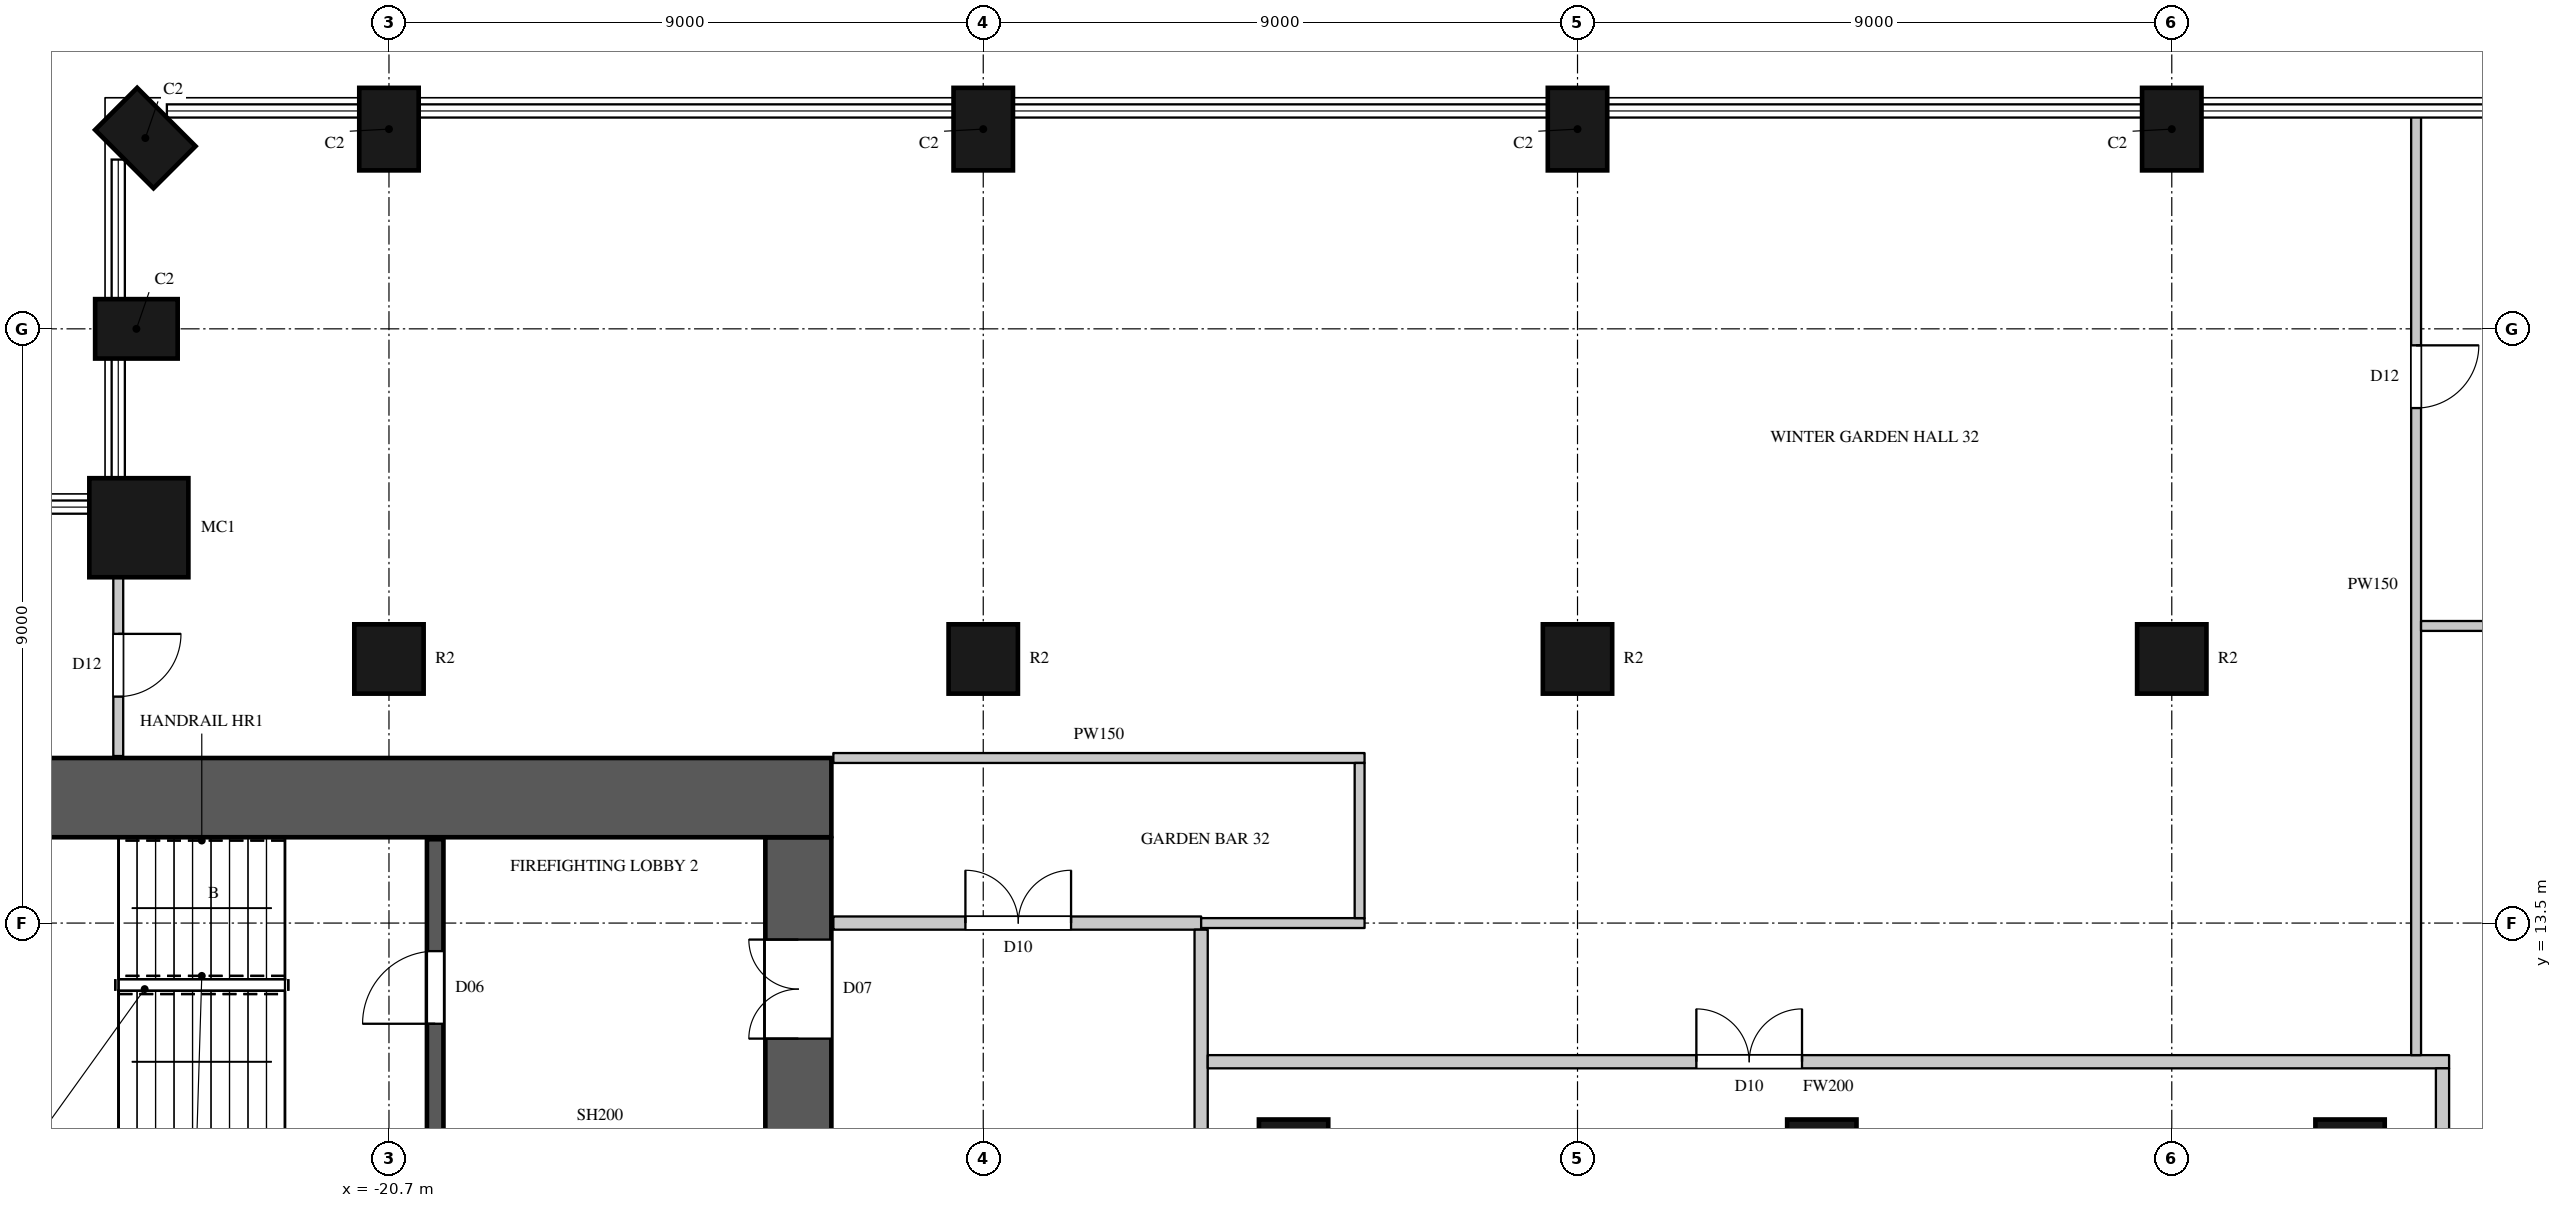
"""IFC4 building model, lengths in metres.
Left out: names, types, materials, properties, quantities, classifications, styles, units other than length and angle.
Written with IfcOpenShell. Run it as: python <this file> out.ifc"""

import sys

from ifc_helpers import new_model, si_unit, direction, frame, frame_2d, origin, origin_2d, place, context, subcontext, project, spatial, rectangle, circle, extrude, element, fill, save


model = new_model("IFC4")
c1 = context("Model", 3, precision=1e-05, world=origin(), true_north=direction((0.0, 1.0)))
c2 = subcontext(c1, "Body", "Model", "MODEL_VIEW")
j1 = project(units=[si_unit("LENGTHUNIT", "METRE"), si_unit("PLANEANGLEUNIT", "RADIAN")], contexts=[c1])
p1 = place(None, origin())
s1 = spatial("IfcSite", under=j1, at=p1, CompositionType="ELEMENT")
p2 = place(p1, origin())
s2 = spatial("IfcBuilding", under=s1, at=p2, CompositionType="ELEMENT")
p3 = place(p2, frame((0.0, 0.0, 145.5)))
s3 = spatial("IfcBuildingStorey", under=s2, at=p3, CompositionType="ELEMENT", Elevation=145.5)
for number, where, z_axis, x_axis in (
    (1, (6.3, 25.525, 0.0), (0.0, 0.0, 1.0), (-1.0, 0.0, 0.0)),
    (2, (-2.7, 25.525, 0.0), (0.0, 0.0, 1.0), (-1.0, 0.0, 0.0)),
    (3, (-11.7, 25.525, 0.0), (0.0, 0.0, 1.0), (-1.0, 0.0, 0.0)),
    (4, (-20.7, 25.525, 0.0), (0.0, 0.0, 1.0), (-1.0, 0.0, 0.0)),
    (5, (-24.39, 25.39, 0.0), (0.0, 0.0, 1.0), (-0.707, -0.707, 0.0)),
    (6, (-24.525, 22.5, 0.0), (0.0, 0.0, 1.0), (0.0, -1.0, 0.0)),
):
    element("IfcColumn", number, at=place(p3, frame(where, z_axis=z_axis, x_axis=x_axis)), inside=s3, PredefinedType="COLUMN", context=c2, shape_type="SweptSolid", body=[
        extrude(rectangle(XDim=0.9, YDim=1.25, at=origin_2d()), origin(), (0.0, 0.0, 1.0), 7.0),
    ])
p4 = place(p3, frame((-24.488, 19.488, 0.0), z_axis=(0.0, 0.0, 1.0), x_axis=(1.0, 0.0, 0.0)))
e7 = element("IfcColumn", 7, at=p4, inside=s3, PredefinedType="COLUMN", context=c2, shape_type="SweptSolid", body=[
    extrude(circle(Radius=0.75, at=origin_2d()), origin(), (0.0, 0.0, 1.0), 7.0),
])
for number, where, z_axis, x_axis in (
    (8, (-20.7, 17.5, 0.0), (0.0, 0.0, 1.0), (1.0, 0.0, 0.0)),
    (9, (-11.7, 17.5, 0.0), (0.0, 0.0, 1.0), (1.0, 0.0, 0.0)),
    (10, (-2.7, 17.5, 0.0), (0.0, 0.0, 1.0), (1.0, 0.0, 0.0)),
    (11, (6.3, 17.5, 0.0), (0.0, 0.0, 1.0), (1.0, 0.0, 0.0)),
    (12, (-7.0, 10.0, 0.0), (0.0, 0.0, 1.0), (1.0, 0.0, 0.0)),
    (13, (1.0, 10.0, 0.0), (0.0, 0.0, 1.0), (1.0, 0.0, 0.0)),
    (14, (9.0, 10.0, 0.0), (0.0, 0.0, 1.0), (1.0, 0.0, 0.0)),
):
    element("IfcColumn", number, at=place(p3, frame(where, z_axis=z_axis, x_axis=x_axis)), inside=s3, PredefinedType="COLUMN", context=c2, shape_type="SweptSolid", body=[
        extrude(circle(Radius=0.525, at=origin_2d()), origin(), (0.0, 0.0, 1.0), 7.0),
    ])
p5 = place(p3, frame((-30.0, 15.4, 0.0), z_axis=(0.0, 0.0, 1.0), x_axis=(1.0, 0.0, 0.0)))
e15 = element("IfcWall", 15, at=p5, inside=s3, PredefinedType="SHEAR", context=c2, shape_type="SweptSolid", body=[
    extrude(rectangle(XDim=16.0, YDim=1.2, at=frame_2d((8.0, 0.0))), origin(), (0.0, 0.0, 1.0), 7.0),
])
p6 = place(p3, frame((-14.5, -14.8, 0.0), z_axis=(0.0, 0.0, 1.0), x_axis=(0.0, 1.0, 0.0)))
e16 = element("IfcWall", 16, at=p6, inside=s3, PredefinedType="SHEAR", context=c2, shape_type="SweptSolid", body=[
    extrude(rectangle(XDim=29.6, YDim=1.0, at=frame_2d((14.8, 0.0))), origin(), (0.0, 0.0, 1.0), 7.0),
])
p7 = place(p6, frame((1.55, 0.0, 0.0)))
e17 = element("IfcOpeningElement", 17, at=p7, cuts=e16, PredefinedType="OPENING", context=c2, shape_type="SweptSolid", body=[
    extrude(rectangle(XDim=1.5, YDim=2.4, at=frame_2d((0.75, 1.2))), frame((0.0, 0.51, 0.0), z_axis=(0.0, -1.0, 0.0), x_axis=(1.0, 0.0, 0.0)), (0.0, 0.0, 1.0), 1.02),
])
p8 = place(p6, frame((26.55, 0.0, 0.0)))
e18 = element("IfcOpeningElement", 18, at=p8, cuts=e16, PredefinedType="OPENING", context=c2, shape_type="SweptSolid", body=[
    extrude(rectangle(XDim=1.5, YDim=2.4, at=frame_2d((0.75, 1.2))), frame((0.0, 0.51, 0.0), z_axis=(0.0, -1.0, 0.0), x_axis=(1.0, 0.0, 0.0)), (0.0, 0.0, 1.0), 1.02),
])
p9 = place(p6, frame((8.45, 0.0, 0.0)))
e19 = element("IfcOpeningElement", 19, at=p9, cuts=e16, PredefinedType="OPENING", context=c2, shape_type="SweptSolid", body=[
    extrude(rectangle(XDim=1.5, YDim=2.4, at=frame_2d((0.75, 1.2))), frame((0.0, 0.51, 0.0), z_axis=(0.0, -1.0, 0.0), x_axis=(1.0, 0.0, 0.0)), (0.0, 0.0, 1.0), 1.02),
])
p10 = place(p6, frame((19.65, 0.0, 0.0)))
e20 = element("IfcOpeningElement", 20, at=p10, cuts=e16, PredefinedType="OPENING", context=c2, shape_type="SweptSolid", body=[
    extrude(rectangle(XDim=1.5, YDim=2.4, at=frame_2d((0.75, 1.2))), frame((0.0, 0.51, 0.0), z_axis=(0.0, -1.0, 0.0), x_axis=(1.0, 0.0, 0.0)), (0.0, 0.0, 1.0), 1.02),
])
p11 = place(p6, frame((14.5, 0.0, 0.0)))
e21 = element("IfcOpeningElement", 21, at=p11, cuts=e16, PredefinedType="OPENING", context=c2, shape_type="SweptSolid", body=[
    extrude(rectangle(XDim=0.6, YDim=2.0, at=frame_2d((0.3, 1.0))), frame((0.0, 0.51, 0.0), z_axis=(0.0, -1.0, 0.0), x_axis=(1.0, 0.0, 0.0)), (0.0, 0.0, 1.0), 1.02),
])
p12 = place(p3, frame((-13.97, 13.5, 0.0), z_axis=(0.0, 0.0, 1.0), x_axis=(1.0, 0.0, 0.0)))
e22 = element("IfcWall", 22, at=p12, inside=s3, PredefinedType="PARTITIONING", context=c2, shape_type="SweptSolid", body=[
    extrude(rectangle(XDim=5.57, YDim=0.2, at=frame_2d((2.785, 0.0))), origin(), (0.0, 0.0, 1.0), 6.7),
])
p13 = place(p12, frame((2.0, 0.0, 0.0)))
e23 = element("IfcOpeningElement", 23, at=p13, cuts=e22, PredefinedType="OPENING", context=c2, shape_type="SweptSolid", body=[
    extrude(rectangle(XDim=1.6, YDim=2.4, at=frame_2d((0.8, 1.2))), frame((0.0, 0.11, 0.0), z_axis=(0.0, -1.0, 0.0), x_axis=(1.0, 0.0, 0.0)), (0.0, 0.0, 1.0), 0.22),
])
p14 = place(p3, frame((-8.4, -13.4, 0.0), z_axis=(0.0, 0.0, 1.0), x_axis=(0.0, 1.0, 0.0)))
e24 = element("IfcWall", 24, at=p14, inside=s3, PredefinedType="PARTITIONING", context=c2, shape_type="SweptSolid", body=[
    extrude(rectangle(XDim=26.8, YDim=0.2, at=frame_2d((13.4, 0.0))), origin(), (0.0, 0.0, 1.0), 6.7),
])
p15 = place(p14, frame((11.5, 0.0, 0.0)))
e25 = element("IfcOpeningElement", 25, at=p15, cuts=e24, PredefinedType="OPENING", context=c2, shape_type="SweptSolid", body=[
    extrude(rectangle(XDim=1.6, YDim=2.4, at=frame_2d((0.8, 1.2))), frame((0.0, 0.11, 0.0), z_axis=(0.0, -1.0, 0.0), x_axis=(1.0, 0.0, 0.0)), (0.0, 0.0, 1.0), 0.22),
])
p16 = place(p3, frame((-8.3, 11.4, 0.0), z_axis=(0.0, 0.0, 1.0), x_axis=(1.0, 0.0, 0.0)))
e26 = element("IfcWall", 26, at=p16, inside=s3, PredefinedType="PARTITIONING", context=c2, shape_type="SweptSolid", body=[
    extrude(rectangle(XDim=18.8, YDim=0.2, at=frame_2d((9.4, 0.0))), origin(), (0.0, 0.0, 1.0), 6.7),
])
p17 = place(p16, frame((7.4, 0.0, 0.0)))
e27 = element("IfcOpeningElement", 27, at=p17, cuts=e26, PredefinedType="OPENING", context=c2, shape_type="SweptSolid", body=[
    extrude(rectangle(XDim=1.6, YDim=2.4, at=frame_2d((0.8, 1.2))), frame((0.0, 0.11, 0.0), z_axis=(0.0, -1.0, 0.0), x_axis=(1.0, 0.0, 0.0)), (0.0, 0.0, 1.0), 0.22),
])
p18 = place(p3, frame((10.4, -11.3, 0.0), z_axis=(0.0, 0.0, 1.0), x_axis=(0.0, 1.0, 0.0)))
e28 = element("IfcWall", 28, at=p18, inside=s3, PredefinedType="PARTITIONING", context=c2, shape_type="SweptSolid", body=[
    extrude(rectangle(XDim=22.6, YDim=0.2, at=frame_2d((11.3, 0.0))), origin(), (0.0, 0.0, 1.0), 6.7),
])
p19 = place(p18, frame((8.9, 0.0, 0.0)))
e29 = element("IfcOpeningElement", 29, at=p19, cuts=e28, PredefinedType="OPENING", context=c2, shape_type="SweptSolid", body=[
    extrude(rectangle(XDim=1.6, YDim=2.4, at=frame_2d((0.8, 1.2))), frame((0.0, 0.11, 0.0), z_axis=(0.0, -1.0, 0.0), x_axis=(1.0, 0.0, 0.0)), (0.0, 0.0, 1.0), 0.22),
])
p20 = place(p18, frame((7.15, 0.0, 0.0)))
e30 = element("IfcOpeningElement", 30, at=p20, cuts=e28, PredefinedType="OPENING", context=c2, shape_type="SweptSolid", body=[
    extrude(rectangle(XDim=1.6, YDim=2.4, at=frame_2d((0.8, 1.2))), frame((0.0, 0.11, 0.0), z_axis=(0.0, -1.0, 0.0), x_axis=(1.0, 0.0, 0.0)), (0.0, 0.0, 1.0), 0.22),
])
p21 = place(p3, frame((-24.8, 16.03, 0.0), z_axis=(0.0, 0.0, 1.0), x_axis=(0.0, 1.0, 0.0)))
e31 = element("IfcWall", 31, at=p21, inside=s3, PredefinedType="PARTITIONING", context=c2, shape_type="SweptSolid", body=[
    extrude(rectangle(XDim=2.758, YDim=0.15, at=frame_2d((1.379, 0.0))), origin(), (0.0, 0.0, 1.0), 6.7),
])
p22 = place(p21, frame((0.9, 0.0, 0.0)))
e32 = element("IfcOpeningElement", 32, at=p22, cuts=e31, PredefinedType="OPENING", context=c2, shape_type="SweptSolid", body=[
    extrude(rectangle(XDim=0.95, YDim=2.2, at=frame_2d((0.475, 1.1))), frame((0.0, 0.085, 0.0), z_axis=(0.0, -1.0, 0.0), x_axis=(1.0, 0.0, 0.0)), (0.0, 0.0, 1.0), 0.17),
])
p23 = place(p3, frame((-13.97, 16.0, 0.0), z_axis=(0.0, 0.0, 1.0), x_axis=(1.0, 0.0, 0.0)))
e33 = element("IfcWall", 33, at=p23, inside=s3, PredefinedType="PARTITIONING", context=c2, shape_type="SweptSolid", body=[
    extrude(rectangle(XDim=8.045, YDim=0.15, at=frame_2d((4.022, 0.0))), origin(), (0.0, 0.0, 1.0), 6.7),
])
p24 = place(p3, frame((-8.4, 13.5, 0.0), z_axis=(0.0, 0.0, 1.0), x_axis=(1.0, 0.0, 0.0)))
e34 = element("IfcWall", 34, at=p24, inside=s3, PredefinedType="PARTITIONING", context=c2, shape_type="SweptSolid", body=[
    extrude(rectangle(XDim=2.475, YDim=0.15, at=frame_2d((1.237, 0.0))), origin(), (0.0, 0.0, 1.0), 6.7),
])
p25 = place(p3, frame((-6.0, 13.575, 0.0), z_axis=(0.0, 0.0, 1.0), x_axis=(0.0, 1.0, 0.0)))
e35 = element("IfcWall", 35, at=p25, inside=s3, PredefinedType="PARTITIONING", context=c2, shape_type="SweptSolid", body=[
    extrude(rectangle(XDim=2.35, YDim=0.15, at=frame_2d((1.175, 0.0))), origin(), (0.0, 0.0, 1.0), 6.7),
])
p26 = place(p3, frame((10.0, 11.5, 0.0), z_axis=(0.0, 0.0, 1.0), x_axis=(0.0, 1.0, 0.0)))
e36 = element("IfcWall", 36, at=p26, inside=s3, PredefinedType="PARTITIONING", context=c2, shape_type="SweptSolid", body=[
    extrude(rectangle(XDim=14.255, YDim=0.15, at=frame_2d((7.127, 0.0))), origin(), (0.0, 0.0, 1.0), 6.7),
])
p27 = place(p26, frame((9.8, 0.0, 0.0)))
e37 = element("IfcOpeningElement", 37, at=p27, cuts=e36, PredefinedType="OPENING", context=c2, shape_type="SweptSolid", body=[
    extrude(rectangle(XDim=0.95, YDim=2.2, at=frame_2d((0.475, 1.1))), frame((0.0, 0.085, 0.0), z_axis=(0.0, -1.0, 0.0), x_axis=(1.0, 0.0, 0.0)), (0.0, 0.0, 1.0), 0.17),
])
p28 = place(p3, frame((10.075, 18.0, 0.0), z_axis=(0.0, 0.0, 1.0), x_axis=(1.0, 0.0, 0.0)))
e38 = element("IfcWall", 38, at=p28, inside=s3, PredefinedType="PARTITIONING", context=c2, shape_type="SweptSolid", body=[
    extrude(rectangle(XDim=3.925, YDim=0.15, at=frame_2d((1.962, 0.0))), origin(), (0.0, 0.0, 1.0), 6.7),
])
p29 = place(p3, frame((-20.0, 10.325, 0.0), z_axis=(0.0, 0.0, 1.0), x_axis=(0.0, 1.0, 0.0)))
e39 = element("IfcWall", 39, at=p29, inside=s3, PredefinedType="SHEAR", context=c2, shape_type="SweptSolid", body=[
    extrude(rectangle(XDim=4.445, YDim=0.25, at=frame_2d((2.223, 0.0))), origin(), (0.0, 0.0, 1.0), 6.7),
])
p30 = place(p29, frame((1.65, 0.0, 0.0)))
e40 = element("IfcOpeningElement", 40, at=p30, cuts=e39, PredefinedType="OPENING", context=c2, shape_type="SweptSolid", body=[
    extrude(rectangle(XDim=1.1, YDim=2.2, at=frame_2d((0.55, 1.1))), frame((0.0, 0.135, 0.0), z_axis=(0.0, -1.0, 0.0), x_axis=(1.0, 0.0, 0.0)), (0.0, 0.0, 1.0), 0.27),
])
p31 = place(p30, origin())
e41 = element("IfcDoor", 41, at=p31, inside=s3, OperationType="SINGLE_SWING_LEFT", PredefinedType="DOOR", context=c2, shape_type="SweptSolid", body=[
    extrude(rectangle(XDim=1.1, YDim=2.2, at=frame_2d((0.55, 1.1))), frame((0.0, 0.025, 0.0), z_axis=(0.0, -1.0, 0.0), x_axis=(1.0, 0.0, 0.0)), (0.0, 0.0, 1.0), 0.05),
])
fill(e40, e41)
p32 = place(p17, origin())
e42 = element("IfcDoor", 42, at=p32, inside=s3, OperationType="DOUBLE_DOOR_SINGLE_SWING", PredefinedType="DOOR", context=c2, shape_type="SweptSolid", body=[
    extrude(rectangle(XDim=1.6, YDim=2.4, at=frame_2d((0.8, 1.2))), frame((0.0, 0.025, 0.0), z_axis=(0.0, -1.0, 0.0), x_axis=(1.0, 0.0, 0.0)), (0.0, 0.0, 1.0), 0.05),
])
fill(e27, e42)
p33 = place(p13, origin())
e43 = element("IfcDoor", 43, at=p33, inside=s3, OperationType="DOUBLE_DOOR_SINGLE_SWING", PredefinedType="DOOR", context=c2, shape_type="SweptSolid", body=[
    extrude(rectangle(XDim=1.6, YDim=2.4, at=frame_2d((0.8, 1.2))), frame((0.0, 0.025, 0.0), z_axis=(0.0, -1.0, 0.0), x_axis=(1.0, 0.0, 0.0)), (0.0, 0.0, 1.0), 0.05),
])
fill(e23, e43)
p34 = place(p27, origin())
e44 = element("IfcDoor", 44, at=p34, inside=s3, OperationType="SINGLE_SWING_LEFT", PredefinedType="DOOR", context=c2, shape_type="SweptSolid", body=[
    extrude(rectangle(XDim=0.95, YDim=2.2, at=frame_2d((0.475, 1.1))), frame((0.0, 0.025, 0.0), z_axis=(0.0, -1.0, 0.0), x_axis=(1.0, 0.0, 0.0)), (0.0, 0.0, 1.0), 0.05),
])
fill(e37, e44)
p35 = place(p22, origin())
e45 = element("IfcDoor", 45, at=p35, inside=s3, OperationType="SINGLE_SWING_LEFT", PredefinedType="DOOR", context=c2, shape_type="SweptSolid", body=[
    extrude(rectangle(XDim=0.95, YDim=2.2, at=frame_2d((0.475, 1.1))), frame((0.0, 0.025, 0.0), z_axis=(0.0, -1.0, 0.0), x_axis=(1.0, 0.0, 0.0)), (0.0, 0.0, 1.0), 0.05),
])
fill(e32, e45)
p36 = place(p8, origin())
e46 = element("IfcDoor", 46, at=p36, inside=s3, OperationType="DOUBLE_DOOR_SINGLE_SWING", PredefinedType="DOOR", context=c2, shape_type="SweptSolid", body=[
    extrude(rectangle(XDim=1.5, YDim=2.4, at=frame_2d((0.75, 1.2))), frame((0.0, 0.495, 0.0), z_axis=(0.0, -1.0, 0.0), x_axis=(1.0, 0.0, 0.0)), (0.0, 0.0, 1.0), 0.05),
])
fill(e18, e46)
save(model, sys.argv[1])
